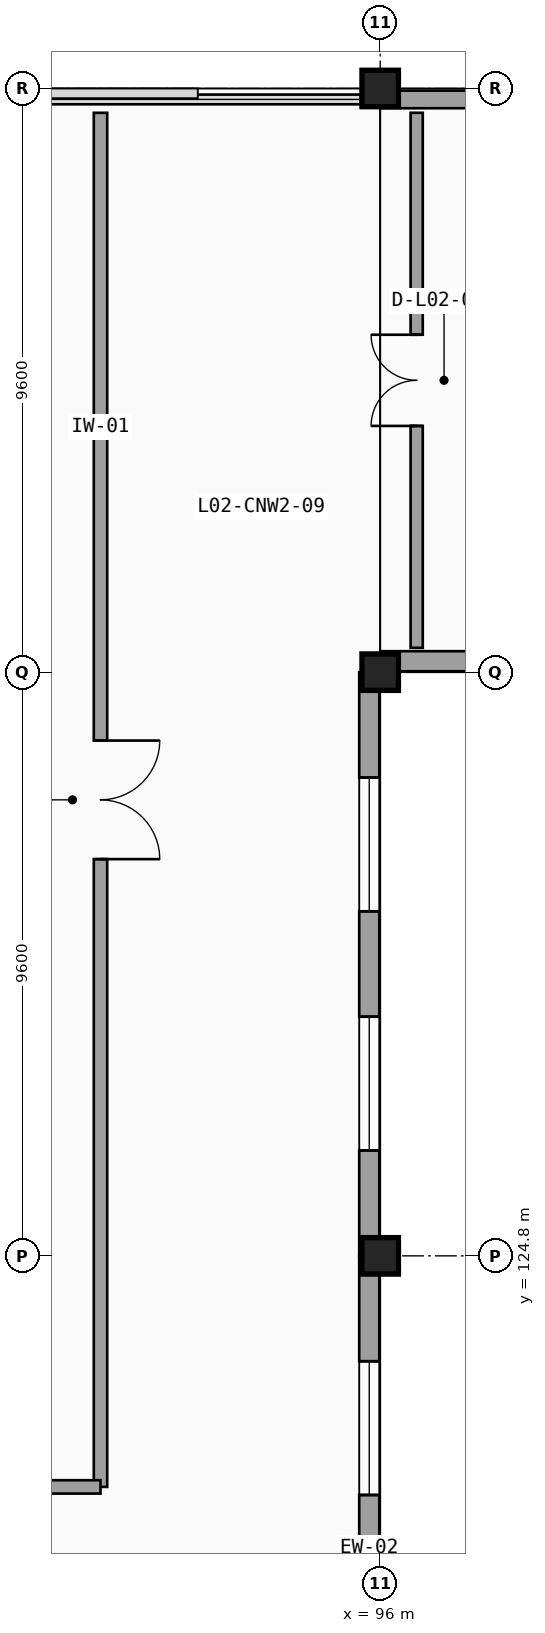
"""IFC4 building model, lengths in metres.
Left out: names, types, materials, properties, quantities, classifications, styles, units other than length and angle.
Written with IfcOpenShell. Run it as: python <this file> out.ifc"""

import sys

from ifc_helpers import new_model, si_unit, direction, frame, frame_2d, origin, origin_2d, place, context, subcontext, project, spatial, rectangle, extrude, element, fill, save


model = new_model("IFC4")
c1 = context("Model", 3, precision=1e-05, world=origin(), true_north=direction((0.0, 1.0)))
c2 = subcontext(c1, "Body", "Model", "MODEL_VIEW")
j1 = project(units=[si_unit("LENGTHUNIT", "METRE"), si_unit("PLANEANGLEUNIT", "RADIAN")], contexts=[c1])
p1 = place(None, origin())
s1 = spatial("IfcSite", under=j1, at=p1, CompositionType="ELEMENT")
p2 = place(p1, origin())
s2 = spatial("IfcBuilding", under=s1, at=p2, CompositionType="ELEMENT")
p3 = place(p2, frame((0.0, 0.0, 9.6)))
s3 = spatial("IfcBuildingStorey", under=s2, at=p3, CompositionType="ELEMENT", Elevation=9.6)
for number, where, z_axis, x_axis in (
    (1, (96.0, 124.8, 0.0), (0.0, 0.0, 1.0), (1.0, 0.0, 0.0)),
    (2, (96.0, 134.4, 0.0), (0.0, 0.0, 1.0), (1.0, 0.0, 0.0)),
    (3, (96.0, 144.0, 0.0), (0.0, 0.0, 1.0), (1.0, 0.0, 0.0)),
):
    element("IfcColumn", number, at=place(p3, frame(where, z_axis=z_axis, x_axis=x_axis)), inside=s3, PredefinedType="COLUMN", context=c2, shape_type="SweptSolid", body=[
        extrude(rectangle(XDim=0.6, YDim=0.6, at=origin_2d()), origin(), (0.0, 0.0, 1.0), 4.5),
    ])
p4 = place(p3, frame((105.6, 143.82, 0.0), z_axis=(0.0, 0.0, 1.0), x_axis=(-1.0, 0.0, 0.0)))
e4 = element("IfcWall", 4, at=p4, inside=s3, PredefinedType="SOLIDWALL", context=c2, shape_type="SweptSolid", body=[
    extrude(rectangle(XDim=9.6, YDim=0.29, at=frame_2d((4.8, 0.0))), origin(), (0.0, 0.0, 1.0), 3.293),
])
p5 = place(p4, frame((3.933, 0.0, 0.95), z_axis=(0.0, 0.0, 1.0), x_axis=(-1.0, 0.0, 0.0)))
e5 = element("IfcOpeningElement", 5, at=p5, cuts=e4, PredefinedType="OPENING", context=c2, shape_type="SweptSolid", body=[
    extrude(rectangle(XDim=2.2, YDim=2.1, at=frame_2d((1.1, 1.05))), frame((0.0, 0.155, 0.0), z_axis=(0.0, -1.0, 0.0), x_axis=(1.0, 0.0, 0.0)), (0.0, 0.0, 1.0), 0.31),
])
p6 = place(p4, frame((7.867, 0.0, 0.95), z_axis=(0.0, 0.0, 1.0), x_axis=(-1.0, 0.0, 0.0)))
e6 = element("IfcOpeningElement", 6, at=p6, cuts=e4, PredefinedType="OPENING", context=c2, shape_type="SweptSolid", body=[
    extrude(rectangle(XDim=2.2, YDim=2.1, at=frame_2d((1.1, 1.05))), frame((0.0, 0.155, 0.0), z_axis=(0.0, -1.0, 0.0), x_axis=(1.0, 0.0, 0.0)), (0.0, 0.0, 1.0), 0.31),
])
p7 = place(p3, frame((95.82, 115.2, 0.0), z_axis=(0.0, 0.0, 1.0), x_axis=(0.0, 1.0, 0.0)))
e7 = element("IfcWall", 7, at=p7, inside=s3, PredefinedType="SOLIDWALL", context=c2, shape_type="SweptSolid", body=[
    extrude(rectangle(XDim=9.6, YDim=0.33, at=frame_2d((4.8, 0.0))), origin(), (0.0, 0.0, 1.0), 3.293),
])
p8 = place(p7, frame((3.933, 0.0, 0.95), z_axis=(0.0, 0.0, 1.0), x_axis=(-1.0, 0.0, 0.0)))
e8 = element("IfcOpeningElement", 8, at=p8, cuts=e7, PredefinedType="OPENING", context=c2, shape_type="SweptSolid", body=[
    extrude(rectangle(XDim=2.2, YDim=2.1, at=frame_2d((1.1, 1.05))), frame((0.0, 0.175, 0.0), z_axis=(0.0, -1.0, 0.0), x_axis=(1.0, 0.0, 0.0)), (0.0, 0.0, 1.0), 0.35),
])
p9 = place(p7, frame((7.867, 0.0, 0.95), z_axis=(0.0, 0.0, 1.0), x_axis=(-1.0, 0.0, 0.0)))
e9 = element("IfcOpeningElement", 9, at=p9, cuts=e7, PredefinedType="OPENING", context=c2, shape_type="SweptSolid", body=[
    extrude(rectangle(XDim=2.2, YDim=2.1, at=frame_2d((1.1, 1.05))), frame((0.0, 0.175, 0.0), z_axis=(0.0, -1.0, 0.0), x_axis=(1.0, 0.0, 0.0)), (0.0, 0.0, 1.0), 0.35),
])
p10 = place(p3, frame((95.82, 124.8, 0.0), z_axis=(0.0, 0.0, 1.0), x_axis=(0.0, 1.0, 0.0)))
e10 = element("IfcWall", 10, at=p10, inside=s3, PredefinedType="SOLIDWALL", context=c2, shape_type="SweptSolid", body=[
    extrude(rectangle(XDim=9.6, YDim=0.33, at=frame_2d((4.8, 0.0))), origin(), (0.0, 0.0, 1.0), 3.613),
])
p11 = place(p10, frame((3.933, 0.0, 0.95), z_axis=(0.0, 0.0, 1.0), x_axis=(-1.0, 0.0, 0.0)))
e11 = element("IfcOpeningElement", 11, at=p11, cuts=e10, PredefinedType="OPENING", context=c2, shape_type="SweptSolid", body=[
    extrude(rectangle(XDim=2.2, YDim=2.1, at=frame_2d((1.1, 1.05))), frame((0.0, 0.175, 0.0), z_axis=(0.0, -1.0, 0.0), x_axis=(1.0, 0.0, 0.0)), (0.0, 0.0, 1.0), 0.35),
])
p12 = place(p10, frame((7.867, 0.0, 0.95), z_axis=(0.0, 0.0, 1.0), x_axis=(-1.0, 0.0, 0.0)))
e12 = element("IfcOpeningElement", 12, at=p12, cuts=e10, PredefinedType="OPENING", context=c2, shape_type="SweptSolid", body=[
    extrude(rectangle(XDim=2.2, YDim=2.1, at=frame_2d((1.1, 1.05))), frame((0.0, 0.175, 0.0), z_axis=(0.0, -1.0, 0.0), x_axis=(1.0, 0.0, 0.0)), (0.0, 0.0, 1.0), 0.35),
])
p13 = place(p3, frame((96.0, 134.58, 0.0), z_axis=(0.0, 0.0, 1.0), x_axis=(1.0, 0.0, 0.0)))
e13 = element("IfcWall", 13, at=p13, inside=s3, PredefinedType="SOLIDWALL", context=c2, shape_type="SweptSolid", body=[
    extrude(rectangle(XDim=9.6, YDim=0.33, at=frame_2d((4.8, 0.0))), origin(), (0.0, 0.0, 1.0), 3.466),
])
p14 = place(p13, frame((3.933, 0.0, 0.95), z_axis=(0.0, 0.0, 1.0), x_axis=(-1.0, 0.0, 0.0)))
e14 = element("IfcOpeningElement", 14, at=p14, cuts=e13, PredefinedType="OPENING", context=c2, shape_type="SweptSolid", body=[
    extrude(rectangle(XDim=2.2, YDim=2.1, at=frame_2d((1.1, 1.05))), frame((0.0, 0.175, 0.0), z_axis=(0.0, -1.0, 0.0), x_axis=(1.0, 0.0, 0.0)), (0.0, 0.0, 1.0), 0.35),
])
p15 = place(p13, frame((7.867, 0.0, 0.95), z_axis=(0.0, 0.0, 1.0), x_axis=(-1.0, 0.0, 0.0)))
e15 = element("IfcOpeningElement", 15, at=p15, cuts=e13, PredefinedType="OPENING", context=c2, shape_type="SweptSolid", body=[
    extrude(rectangle(XDim=2.2, YDim=2.1, at=frame_2d((1.1, 1.05))), frame((0.0, 0.175, 0.0), z_axis=(0.0, -1.0, 0.0), x_axis=(1.0, 0.0, 0.0)), (0.0, 0.0, 1.0), 0.35),
])
p16 = place(p3, frame((91.4, 143.6, 0.0), z_axis=(0.0, 0.0, 1.0), x_axis=(0.0, -1.0, 0.0)))
e16 = element("IfcWall", 16, at=p16, inside=s3, PredefinedType="PARTITIONING", context=c2, shape_type="SweptSolid", body=[
    extrude(rectangle(XDim=22.6, YDim=0.22, at=frame_2d((11.3, 0.0))), origin(), (0.0, 0.0, 1.0), 3.466),
])
p17 = place(p16, frame((10.325, 0.0, 0.0), z_axis=(0.0, 0.0, 1.0), x_axis=(1.0, 0.0, 0.0)))
e17 = element("IfcOpeningElement", 17, at=p17, cuts=e16, PredefinedType="OPENING", context=c2, shape_type="SweptSolid", body=[
    extrude(rectangle(XDim=1.95, YDim=2.35, at=frame_2d((0.975, 1.175))), frame((0.0, 0.12, 0.0), z_axis=(0.0, -1.0, 0.0), x_axis=(1.0, 0.0, 0.0)), (0.0, 0.0, 1.0), 0.24),
])
p18 = place(p3, frame((91.4, 121.0, 0.0), z_axis=(0.0, 0.0, 1.0), x_axis=(-1.0, 0.0, 0.0)))
e18 = element("IfcWall", 18, at=p18, inside=s3, PredefinedType="PARTITIONING", context=c2, shape_type="SweptSolid", body=[
    extrude(rectangle(XDim=6.32, YDim=0.22, at=frame_2d((3.16, 0.0))), origin(), (0.0, 0.0, 1.0), 3.613),
])
p19 = place(p3, frame((96.6, 134.8, 0.0), z_axis=(0.0, 0.0, 1.0), x_axis=(0.0, 1.0, 0.0)))
e19 = element("IfcWall", 19, at=p19, inside=s3, PredefinedType="PARTITIONING", context=c2, shape_type="SweptSolid", body=[
    extrude(rectangle(XDim=8.8, YDim=0.2, at=frame_2d((4.4, 0.0))), origin(), (0.0, 0.0, 1.0), 3.765),
])
p20 = place(p19, frame((3.65, 0.0, 0.0), z_axis=(0.0, 0.0, 1.0), x_axis=(1.0, 0.0, 0.0)))
e20 = element("IfcOpeningElement", 20, at=p20, cuts=e19, PredefinedType="OPENING", context=c2, shape_type="SweptSolid", body=[
    extrude(rectangle(XDim=1.5, YDim=2.25, at=frame_2d((0.75, 1.125))), frame((0.0, 0.11, 0.0), z_axis=(0.0, -1.0, 0.0), x_axis=(1.0, 0.0, 0.0)), (0.0, 0.0, 1.0), 0.22),
])
p21 = place(p9, origin())
e21 = element("IfcWindow", 21, at=p21, inside=s3, PartitioningType="SINGLE_PANEL", PredefinedType="WINDOW", context=c2, shape_type="SweptSolid", body=[
    extrude(rectangle(XDim=2.2, YDim=2.1, at=frame_2d((1.1, 1.05))), frame((0.0, 0.03, 0.0), z_axis=(0.0, -1.0, 0.0), x_axis=(1.0, 0.0, 0.0)), (0.0, 0.0, 1.0), 0.06),
])
fill(e9, e21)
p22 = place(p11, origin())
e22 = element("IfcWindow", 22, at=p22, inside=s3, PartitioningType="SINGLE_PANEL", PredefinedType="WINDOW", context=c2, shape_type="SweptSolid", body=[
    extrude(rectangle(XDim=2.2, YDim=2.1, at=frame_2d((1.1, 1.05))), frame((0.0, 0.03, 0.0), z_axis=(0.0, -1.0, 0.0), x_axis=(1.0, 0.0, 0.0)), (0.0, 0.0, 1.0), 0.06),
])
fill(e11, e22)
p23 = place(p12, origin())
e23 = element("IfcWindow", 23, at=p23, inside=s3, PartitioningType="SINGLE_PANEL", PredefinedType="WINDOW", context=c2, shape_type="SweptSolid", body=[
    extrude(rectangle(XDim=2.2, YDim=2.1, at=frame_2d((1.1, 1.05))), frame((0.0, 0.03, 0.0), z_axis=(0.0, -1.0, 0.0), x_axis=(1.0, 0.0, 0.0)), (0.0, 0.0, 1.0), 0.06),
])
fill(e12, e23)
p24 = place(p17, origin())
e24 = element("IfcDoor", 24, at=p24, inside=s3, OperationType="DOUBLE_DOOR_SINGLE_SWING", PredefinedType="DOOR", context=c2, shape_type="SweptSolid", body=[
    extrude(rectangle(XDim=1.95, YDim=2.35, at=frame_2d((0.975, 1.175))), frame((0.0, 0.025, 0.0), z_axis=(0.0, -1.0, 0.0), x_axis=(1.0, 0.0, 0.0)), (0.0, 0.0, 1.0), 0.05),
])
fill(e17, e24)
p25 = place(p20, origin())
e25 = element("IfcDoor", 25, at=p25, inside=s3, OperationType="DOUBLE_DOOR_SINGLE_SWING", PredefinedType="DOOR", context=c2, shape_type="SweptSolid", body=[
    extrude(rectangle(XDim=1.5, YDim=2.25, at=frame_2d((0.75, 1.125))), frame((0.0, 0.025, 0.0), z_axis=(0.0, -1.0, 0.0), x_axis=(1.0, 0.0, 0.0)), (0.0, 0.0, 1.0), 0.05),
])
fill(e20, e25)
save(model, sys.argv[1])
